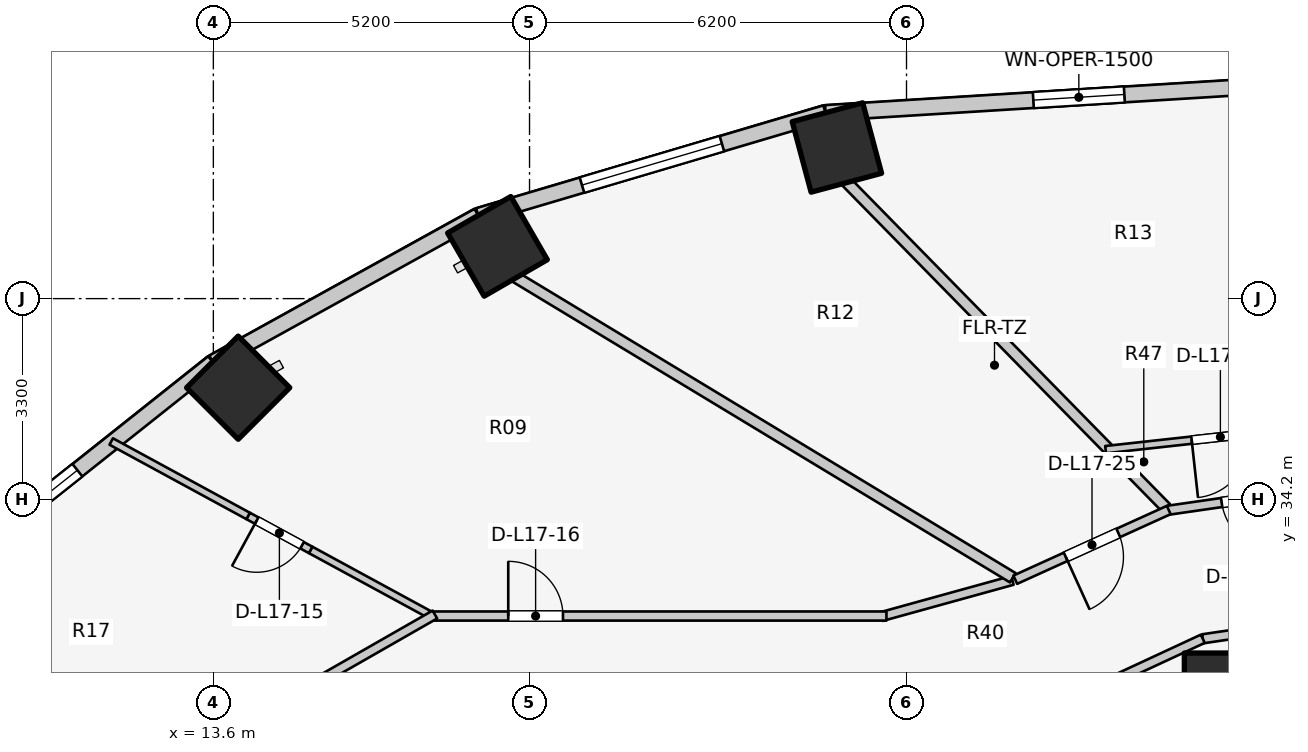
"""IFC4 building model, lengths in metres.
Left out: names, types, materials, properties, quantities, classifications, styles, units other than length and angle.
Written with IfcOpenShell. Run it as: python <this file> out.ifc"""

import sys

from ifc_helpers import new_model, si_unit, direction, frame, frame_2d, origin, origin_2d, place, context, subcontext, project, spatial, rectangle, extrude, element, fill, save


model = new_model("IFC4")
c1 = context("Model", 3, precision=1e-05, world=origin(), true_north=direction((0.0, 1.0)))
c2 = subcontext(c1, "Body", "Model", "MODEL_VIEW")
j1 = project(units=[si_unit("LENGTHUNIT", "METRE"), si_unit("PLANEANGLEUNIT", "RADIAN")], contexts=[c1])
p1 = place(None, origin())
s1 = spatial("IfcSite", under=j1, at=p1, CompositionType="ELEMENT")
p2 = place(p1, origin())
s2 = spatial("IfcBuilding", under=s1, at=p2, CompositionType="ELEMENT")
p3 = place(p2, frame((0.0, 0.0, 58.6)))
s3 = spatial("IfcBuildingStorey", under=s2, at=p3, CompositionType="ELEMENT", Elevation=58.6)
p4 = place(p3, frame((30.069, 31.172, 0.0), z_axis=(0.0, 0.0, 1.0), x_axis=(1.0, 0.0, 0.0)))
e1 = element("IfcColumn", 1, at=p4, inside=s3, PredefinedType="COLUMN", context=c2, shape_type="SweptSolid", body=[
    extrude(rectangle(XDim=1.0, YDim=1.0, at=origin_2d()), origin(), (0.0, 0.0, 1.0), 3.1),
])
for number, where, z_axis, x_axis in (
    (2, (23.855, 39.986, 0.0), (0.0, 0.0, 1.0), (-0.259, 0.966, 0.0)),
    (3, (18.273, 38.359, 0.0), (0.0, 0.0, 1.0), (-0.5, 0.866, 0.0)),
    (4, (14.008, 36.035, 0.0), (0.0, 0.0, 1.0), (-0.707, 0.707, 0.0)),
):
    element("IfcColumn", number, at=place(p3, frame(where, z_axis=z_axis, x_axis=x_axis)), inside=s3, PredefinedType="COLUMN", context=c2, shape_type="SweptSolid", body=[
        extrude(rectangle(XDim=1.2, YDim=1.2, at=origin_2d()), origin(), (0.0, 0.0, 1.0), 3.1),
    ])
p5 = place(p3, frame((32.0, 41.069, 0.0), z_axis=(0.0, 0.0, 1.0), x_axis=(-0.998090514779, -0.061768311519, 0.0)))
e5 = element("IfcWall", 5, at=p5, inside=s3, PredefinedType="STANDARD", context=c2, shape_type="SweptSolid", body=[
    extrude(rectangle(XDim=8.348, YDim=0.26, at=frame_2d((4.174, 0.0))), origin(), (0.0, 0.0, 1.0), 2.85),
])
p6 = place(p5, frame((3.424, 0.0, 0.75)))
e6 = element("IfcOpeningElement", 6, at=p6, cuts=e5, PredefinedType="OPENING", context=c2, shape_type="SweptSolid", body=[
    extrude(rectangle(XDim=1.5, YDim=1.6, at=frame_2d((0.75, 0.8))), frame((0.0, 0.14, 0.0), z_axis=(0.0, -1.0, 0.0), x_axis=(1.0, 0.0, 0.0)), (0.0, 0.0, 1.0), 0.28),
])
p7 = place(p3, frame((23.668, 40.553, 0.0), z_axis=(0.0, 0.0, 1.0), x_axis=(-0.958843593522, -0.283934786811, 0.0)))
e7 = element("IfcWall", 7, at=p7, inside=s3, PredefinedType="STANDARD", context=c2, shape_type="SweptSolid", body=[
    extrude(rectangle(XDim=5.955, YDim=0.26, at=frame_2d((2.978, 0.0))), origin(), (0.0, 0.0, 1.0), 2.85),
])
p8 = place(p7, frame((1.778, 0.0, 0.75)))
e8 = element("IfcOpeningElement", 8, at=p8, cuts=e7, PredefinedType="OPENING", context=c2, shape_type="SweptSolid", body=[
    extrude(rectangle(XDim=2.4, YDim=1.7, at=frame_2d((1.2, 0.85))), frame((0.0, 0.14, 0.0), z_axis=(0.0, -1.0, 0.0), x_axis=(1.0, 0.0, 0.0)), (0.0, 0.0, 1.0), 0.28),
])
p9 = place(p3, frame((17.958, 38.862, 0.0), z_axis=(0.0, 0.0, 1.0), x_axis=(-0.875137303239, -0.483874674352, 0.0)))
e9 = element("IfcWall", 9, at=p9, inside=s3, PredefinedType="STANDARD", context=c2, shape_type="SweptSolid", body=[
    extrude(rectangle(XDim=4.985, YDim=0.26, at=frame_2d((2.493, 0.0))), origin(), (0.0, 0.0, 1.0), 2.85),
])
p10 = place(p3, frame((13.595, 36.45, 0.0), z_axis=(0.0, 0.0, 1.0), x_axis=(-0.783123133379, -0.621866672179, 0.0)))
e10 = element("IfcWall", 10, at=p10, inside=s3, PredefinedType="STANDARD", context=c2, shape_type="SweptSolid", body=[
    extrude(rectangle(XDim=4.839, YDim=0.26, at=frame_2d((2.419, 0.0))), origin(), (0.0, 0.0, 1.0), 2.85),
])
p11 = place(p10, frame((2.849, 0.0, 0.75)))
e11 = element("IfcOpeningElement", 11, at=p11, cuts=e10, PredefinedType="OPENING", context=c2, shape_type="SweptSolid", body=[
    extrude(rectangle(XDim=1.2, YDim=1.5, at=frame_2d((0.6, 0.75))), frame((0.0, 0.14, 0.0), z_axis=(0.0, -1.0, 0.0), x_axis=(1.0, 0.0, 0.0)), (0.0, 0.0, 1.0), 0.28),
])
p12 = place(p3, frame((32.0, 32.22, 0.0), z_axis=(0.0, 0.0, 1.0), x_axis=(-0.989268584896, -0.146108408166, 0.0)))
e12 = element("IfcWall", 12, at=p12, inside=s3, PredefinedType="PARTITIONING", context=c2, shape_type="SweptSolid", body=[
    extrude(rectangle(XDim=2.151, YDim=0.15, at=frame_2d((1.075, 0.0))), origin(), (0.0, 0.0, 1.0), 2.237),
])
p13 = place(p3, frame((29.873, 31.906, 0.0), z_axis=(0.0, 0.0, 1.0), x_axis=(-0.906943449489, -0.421252393975, 0.0)))
e13 = element("IfcWall", 13, at=p13, inside=s3, PredefinedType="PARTITIONING", context=c2, shape_type="SweptSolid", body=[
    extrude(rectangle(XDim=2.186, YDim=0.15, at=frame_2d((1.093, 0.0))), origin(), (0.0, 0.0, 1.0), 2.237),
])
p14 = place(p3, frame((17.244, 32.256, 0.0), z_axis=(0.0, 0.0, 1.0), x_axis=(-0.878580476603, 0.477594332181, 0.0)))
e14 = element("IfcWall", 14, at=p14, inside=s3, PredefinedType="MOVABLE", context=c2, shape_type="SweptSolid", body=[
    extrude(rectangle(XDim=2.326, YDim=0.12, at=frame_2d((1.163, 0.0))), origin(), (0.0, 0.0, 1.0), 2.855),
])
p15 = place(p3, frame((15.2, 33.367, 0.0), z_axis=(0.0, 0.0, 1.0), x_axis=(-0.878540750178, 0.4776674055, 0.0)))
e15 = element("IfcWall", 15, at=p15, inside=s3, PredefinedType="MOVABLE", context=c2, shape_type="SweptSolid", body=[
    extrude(rectangle(XDim=1.17, YDim=0.12, at=frame_2d((0.585, 0.0))), origin(), (0.0, 0.0, 1.0), 2.11),
])
p16 = place(p15, frame((0.16, 0.0, 0.0)))
e16 = element("IfcOpeningElement", 16, at=p16, cuts=e15, PredefinedType="OPENING", context=c2, shape_type="SweptSolid", body=[
    extrude(rectangle(XDim=0.85, YDim=2.05, at=frame_2d((0.425, 1.025))), frame((0.0, 0.07, 0.0), z_axis=(0.0, -1.0, 0.0), x_axis=(1.0, 0.0, 0.0)), (0.0, 0.0, 1.0), 0.14),
])
p17 = place(p3, frame((14.172, 33.926, 0.0), z_axis=(0.0, 0.0, 1.0), x_axis=(-0.878524579981, 0.477697145029, 0.0)))
e17 = element("IfcWall", 17, at=p17, inside=s3, PredefinedType="MOVABLE", context=c2, shape_type="SweptSolid", body=[
    extrude(rectangle(XDim=2.563, YDim=0.12, at=frame_2d((1.281, 0.0))), origin(), (0.0, 0.0, 1.0), 2.069),
])
p18 = place(p3, frame((26.742, 32.867, 0.0), z_axis=(0.0, 0.0, 1.0), x_axis=(-0.963833843713, -0.266503886865, 0.0)))
e18 = element("IfcWall", 18, at=p18, inside=s3, PredefinedType="PARTITIONING", context=c2, shape_type="SweptSolid", body=[
    extrude(rectangle(XDim=2.232, YDim=0.15, at=frame_2d((1.116, 0.0))), origin(), (0.0, 0.0, 1.0), 2.237),
])
p19 = place(p3, frame((17.15, 32.28, 0.0), z_axis=(0.0, 0.0, 1.0), x_axis=(1.0, 0.0, 0.0)))
e19 = element("IfcWall", 19, at=p19, inside=s3, PredefinedType="PARTITIONING", context=c2, shape_type="SweptSolid", body=[
    extrude(rectangle(XDim=7.52, YDim=0.15, at=frame_2d((3.76, 0.0))), origin(), (0.0, 0.0, 1.0), 2.237),
])
p20 = place(p19, frame((1.3, 0.0, 0.0)))
e20 = element("IfcOpeningElement", 20, at=p20, cuts=e19, PredefinedType="OPENING", context=c2, shape_type="SweptSolid", body=[
    extrude(rectangle(XDim=0.9, YDim=2.1, at=frame_2d((0.45, 1.05))), frame((0.0, 0.085, 0.0), z_axis=(0.0, -1.0, 0.0), x_axis=(1.0, 0.0, 0.0)), (0.0, 0.0, 1.0), 0.17),
])
p21 = place(p3, frame((17.243, 32.305, 0.0), z_axis=(0.0, 0.0, 1.0), x_axis=(-0.867991349648, -0.496579315857, 0.0)))
e21 = element("IfcWall", 21, at=p21, inside=s3, PredefinedType="PARTITIONING", context=c2, shape_type="SweptSolid", body=[
    extrude(rectangle(XDim=2.567, YDim=0.15, at=frame_2d((1.283, 0.0))), origin(), (0.0, 0.0, 1.0), 2.069),
])
p22 = place(p3, frame((29.267, 34.061, 0.0), z_axis=(0.0, 0.0, 1.0), x_axis=(-0.700234780085, 0.713912636644, 0.0)))
e22 = element("IfcWall", 22, at=p22, inside=s3, PredefinedType="PARTITIONING", context=c2, shape_type="SweptSolid", body=[
    extrude(rectangle(XDim=7.515, YDim=0.18, at=frame_2d((3.757, 0.0))), origin(), (0.0, 0.0, 1.0), 2.237),
])
p23 = place(p3, frame((26.748, 32.91, 0.0), z_axis=(0.0, 0.0, 1.0), x_axis=(-0.855817136021, 0.517278483694, 0.0)))
e23 = element("IfcWall", 23, at=p23, inside=s3, PredefinedType="PARTITIONING", context=c2, shape_type="SweptSolid", body=[
    extrude(rectangle(XDim=9.564, YDim=0.18, at=frame_2d((4.782, 0.0))), origin(), (0.0, 0.0, 1.0), 2.237),
])
p24 = place(p3, frame((32.05, 35.432, 0.0), z_axis=(0.0, 0.0, 1.0), x_axis=(-0.993997647441, -0.109401448263, 0.0)))
e24 = element("IfcWall", 24, at=p24, inside=s3, PredefinedType="MOVABLE", context=c2, shape_type="SweptSolid", body=[
    extrude(rectangle(XDim=3.798, YDim=0.12, at=frame_2d((1.899, 0.0))), origin(), (0.0, 0.0, 1.0), 2.237),
])
p25 = place(p24, frame((1.424, 0.0, 0.0)))
e25 = element("IfcOpeningElement", 25, at=p25, cuts=e24, PredefinedType="OPENING", context=c2, shape_type="SweptSolid", body=[
    extrude(rectangle(XDim=0.95, YDim=2.1, at=frame_2d((0.475, 1.05))), frame((0.0, 0.07, 0.0), z_axis=(0.0, -1.0, 0.0), x_axis=(1.0, 0.0, 0.0)), (0.0, 0.0, 1.0), 0.14),
])
p26 = place(p3, frame((32.007, 34.41, 0.0), z_axis=(0.0, 0.0, 1.0), x_axis=(-0.989748682384, -0.142819976611, 0.0)))
e26 = element("IfcWall", 26, at=p26, inside=s3, PredefinedType="PARTITIONING", context=c2, shape_type="SweptSolid", body=[
    extrude(rectangle(XDim=2.737, YDim=0.15, at=frame_2d((1.368, 0.0))), origin(), (0.0, 0.0, 1.0), 2.237),
])
p27 = place(p26, frame((0.893, 0.0, 0.0)))
e27 = element("IfcOpeningElement", 27, at=p27, cuts=e26, PredefinedType="OPENING", context=c2, shape_type="SweptSolid", body=[
    extrude(rectangle(XDim=0.95, YDim=2.1, at=frame_2d((0.475, 1.05))), frame((0.0, 0.085, 0.0), z_axis=(0.0, -1.0, 0.0), x_axis=(1.0, 0.0, 0.0)), (0.0, 0.0, 1.0), 0.17),
])
p28 = place(p3, frame((29.313, 34.023, 0.0), z_axis=(0.0, 0.0, 1.0), x_axis=(-0.910568469686, -0.41335827319, 0.0)))
e28 = element("IfcWall", 28, at=p28, inside=s3, PredefinedType="PARTITIONING", context=c2, shape_type="SweptSolid", body=[
    extrude(rectangle(XDim=2.772, YDim=0.15, at=frame_2d((1.386, 0.0))), origin(), (0.0, 0.0, 1.0), 2.237),
])
p29 = place(p28, frame((0.911, 0.0, 0.0)))
e29 = element("IfcOpeningElement", 29, at=p29, cuts=e28, PredefinedType="OPENING", context=c2, shape_type="SweptSolid", body=[
    extrude(rectangle(XDim=0.95, YDim=2.1, at=frame_2d((0.475, 1.05))), frame((0.0, 0.085, 0.0), z_axis=(0.0, -1.0, 0.0), x_axis=(1.0, 0.0, 0.0)), (0.0, 0.0, 1.0), 0.17),
])
p30 = place(p6, origin())
e30 = element("IfcWindow", 30, at=p30, inside=s3, PartitioningType="SINGLE_PANEL", PredefinedType="WINDOW", context=c2, shape_type="SweptSolid", body=[
    extrude(rectangle(XDim=1.5, YDim=1.6, at=frame_2d((0.75, 0.8))), frame((0.0, 0.03, 0.0), z_axis=(0.0, -1.0, 0.0), x_axis=(1.0, 0.0, 0.0)), (0.0, 0.0, 1.0), 0.06),
])
fill(e6, e30)
p31 = place(p8, origin())
e31 = element("IfcWindow", 31, at=p31, inside=s3, PartitioningType="SINGLE_PANEL", PredefinedType="WINDOW", context=c2, shape_type="SweptSolid", body=[
    extrude(rectangle(XDim=2.4, YDim=1.7, at=frame_2d((1.2, 0.85))), frame((0.0, 0.03, 0.0), z_axis=(0.0, -1.0, 0.0), x_axis=(1.0, 0.0, 0.0)), (0.0, 0.0, 1.0), 0.06),
])
fill(e8, e31)
p32 = place(p11, origin())
e32 = element("IfcWindow", 32, at=p32, inside=s3, PartitioningType="SINGLE_PANEL", PredefinedType="WINDOW", context=c2, shape_type="SweptSolid", body=[
    extrude(rectangle(XDim=1.2, YDim=1.5, at=frame_2d((0.6, 0.75))), frame((0.0, 0.03, 0.0), z_axis=(0.0, -1.0, 0.0), x_axis=(1.0, 0.0, 0.0)), (0.0, 0.0, 1.0), 0.06),
])
fill(e11, e32)
p33 = place(p16, origin())
e33 = element("IfcDoor", 33, at=p33, inside=s3, OperationType="SINGLE_SWING_RIGHT", PredefinedType="DOOR", context=c2, shape_type="SweptSolid", body=[
    extrude(rectangle(XDim=0.85, YDim=2.05, at=frame_2d((0.425, 1.025))), frame((0.0, 0.025, 0.0), z_axis=(0.0, -1.0, 0.0), x_axis=(1.0, 0.0, 0.0)), (0.0, 0.0, 1.0), 0.05),
])
fill(e16, e33)
p34 = place(p20, origin())
e34 = element("IfcDoor", 34, at=p34, inside=s3, OperationType="SINGLE_SWING_LEFT", PredefinedType="DOOR", context=c2, shape_type="SweptSolid", body=[
    extrude(rectangle(XDim=0.9, YDim=2.1, at=frame_2d((0.45, 1.05))), frame((0.0, 0.025, 0.0), z_axis=(0.0, -1.0, 0.0), x_axis=(1.0, 0.0, 0.0)), (0.0, 0.0, 1.0), 0.05),
])
fill(e20, e34)
p35 = place(p25, origin())
e35 = element("IfcDoor", 35, at=p35, inside=s3, OperationType="SINGLE_SWING_RIGHT", PredefinedType="DOOR", context=c2, shape_type="SweptSolid", body=[
    extrude(rectangle(XDim=0.95, YDim=2.1, at=frame_2d((0.475, 1.05))), frame((0.0, 0.025, 0.0), z_axis=(0.0, -1.0, 0.0), x_axis=(1.0, 0.0, 0.0)), (0.0, 0.0, 1.0), 0.05),
])
fill(e25, e35)
p36 = place(p27, origin())
e36 = element("IfcDoor", 36, at=p36, inside=s3, OperationType="SINGLE_SWING_LEFT", PredefinedType="DOOR", context=c2, shape_type="SweptSolid", body=[
    extrude(rectangle(XDim=0.95, YDim=2.1, at=frame_2d((0.475, 1.05))), frame((0.0, 0.025, 0.0), z_axis=(0.0, -1.0, 0.0), x_axis=(1.0, 0.0, 0.0)), (0.0, 0.0, 1.0), 0.05),
])
fill(e27, e36)
p37 = place(p29, origin())
e37 = element("IfcDoor", 37, at=p37, inside=s3, OperationType="SINGLE_SWING_RIGHT", PredefinedType="DOOR", context=c2, shape_type="SweptSolid", body=[
    extrude(rectangle(XDim=0.95, YDim=2.1, at=frame_2d((0.475, 1.05))), frame((0.0, 0.025, 0.0), z_axis=(0.0, -1.0, 0.0), x_axis=(1.0, 0.0, 0.0)), (0.0, 0.0, 1.0), 0.05),
])
fill(e29, e37)
save(model, sys.argv[1])
